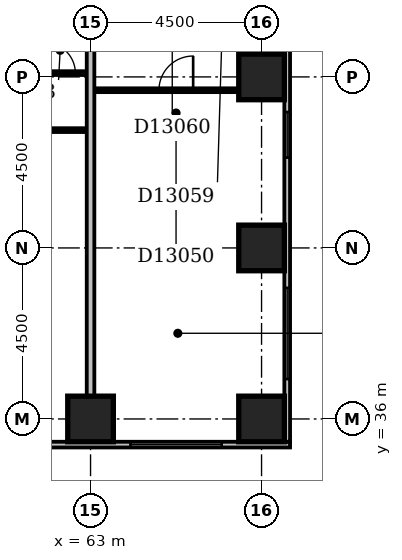
"""IFC4 building model, lengths in metres.
Left out: names, types, materials, properties, quantities, classifications, styles, units other than length and angle.
Written with IfcOpenShell. Run it as: python <this file> out.ifc"""

import sys

from ifc_helpers import new_model, si_unit, direction, frame, frame_2d, origin, origin_2d, place, context, subcontext, project, spatial, rectangle, extrude, element, fill, save


model = new_model("IFC4")
c1 = context("Model", 3, precision=1e-05, world=origin(), true_north=direction((0.0, 1.0)))
c2 = subcontext(c1, "Body", "Model", "MODEL_VIEW")
j1 = project(units=[si_unit("LENGTHUNIT", "METRE"), si_unit("PLANEANGLEUNIT", "RADIAN")], contexts=[c1])
p1 = place(None, origin())
s1 = spatial("IfcSite", under=j1, at=p1, CompositionType="ELEMENT")
p2 = place(p1, origin())
s2 = spatial("IfcBuilding", under=s1, at=p2, CompositionType="ELEMENT")
p3 = place(p2, frame((0.0, 0.0, 57.8)))
s3 = spatial("IfcBuildingStorey", under=s2, at=p3, CompositionType="ELEMENT", Elevation=57.8)
for number, where, z_axis, x_axis in (
    (1, (63.0, 36.0, -0.3), (0.0, 0.0, 1.0), (1.0, 0.0, 0.0)),
    (2, (67.5, 36.0, -0.3), (0.0, 0.0, 1.0), (1.0, 0.0, 0.0)),
    (3, (67.5, 40.5, -0.3), (0.0, 0.0, 1.0), (1.0, 0.0, 0.0)),
    (4, (67.5, 45.0, -0.3), (0.0, 0.0, 1.0), (1.0, 0.0, 0.0)),
):
    element("IfcColumn", number, at=place(p3, frame(where, z_axis=z_axis, x_axis=x_axis)), inside=s3, PredefinedType="COLUMN", context=c2, shape_type="SweptSolid", body=[
        extrude(rectangle(XDim=1.2, YDim=1.2, at=origin_2d()), origin(), (0.0, 0.0, 1.0), 3.6),
    ])
p4 = place(p3, frame((23.1, 35.325, 0.0), z_axis=(0.0, 0.0, 1.0), x_axis=(1.0, 0.0, 0.0)))
e5 = element("IfcWall", 5, at=p4, inside=s3, PredefinedType="STANDARD", context=c2, shape_type="SweptSolid", body=[
    extrude(rectangle(XDim=45.15, YDim=0.15, at=frame_2d((22.575, 0.0))), origin(), (0.0, 0.0, 1.0), 2.7),
])
p5 = place(p4, frame((0.45, 0.0, 0.6)))
e6 = element("IfcOpeningElement", 6, at=p5, cuts=e5, PredefinedType="OPENING", context=c2, shape_type="SweptSolid", body=[
    extrude(rectangle(XDim=2.4, YDim=1.8, at=frame_2d((1.2, 0.9))), frame((0.0, 0.087, 0.0), z_axis=(0.0, -1.0, 0.0), x_axis=(1.0, 0.0, 0.0)), (0.0, 0.0, 1.0), 0.174),
])
p6 = place(p4, frame((6.854, 0.0, 0.6)))
e7 = element("IfcOpeningElement", 7, at=p6, cuts=e5, PredefinedType="OPENING", context=c2, shape_type="SweptSolid", body=[
    extrude(rectangle(XDim=0.6, YDim=1.8, at=frame_2d((0.3, 0.9))), frame((0.0, 0.087, 0.0), z_axis=(0.0, -1.0, 0.0), x_axis=(1.0, 0.0, 0.0)), (0.0, 0.0, 1.0), 0.174),
])
p7 = place(p4, frame((9.45, 0.0, 0.6)))
e8 = element("IfcOpeningElement", 8, at=p7, cuts=e5, PredefinedType="OPENING", context=c2, shape_type="SweptSolid", body=[
    extrude(rectangle(XDim=2.4, YDim=1.8, at=frame_2d((1.2, 0.9))), frame((0.0, 0.087, 0.0), z_axis=(0.0, -1.0, 0.0), x_axis=(1.0, 0.0, 0.0)), (0.0, 0.0, 1.0), 0.174),
])
p8 = place(p4, frame((13.95, 0.0, 0.6)))
e9 = element("IfcOpeningElement", 9, at=p8, cuts=e5, PredefinedType="OPENING", context=c2, shape_type="SweptSolid", body=[
    extrude(rectangle(XDim=2.4, YDim=1.8, at=frame_2d((1.2, 0.9))), frame((0.0, 0.087, 0.0), z_axis=(0.0, -1.0, 0.0), x_axis=(1.0, 0.0, 0.0)), (0.0, 0.0, 1.0), 0.174),
])
p9 = place(p4, frame((18.323, 0.0, 0.6)))
e10 = element("IfcOpeningElement", 10, at=p9, cuts=e5, PredefinedType="OPENING", context=c2, shape_type="SweptSolid", body=[
    extrude(rectangle(XDim=1.2, YDim=1.8, at=frame_2d((0.6, 0.9))), frame((0.0, 0.087, 0.0), z_axis=(0.0, -1.0, 0.0), x_axis=(1.0, 0.0, 0.0)), (0.0, 0.0, 1.0), 0.174),
])
p10 = place(p4, frame((22.95, 0.0, 0.6)))
e11 = element("IfcOpeningElement", 11, at=p10, cuts=e5, PredefinedType="OPENING", context=c2, shape_type="SweptSolid", body=[
    extrude(rectangle(XDim=2.4, YDim=1.8, at=frame_2d((1.2, 0.9))), frame((0.0, 0.087, 0.0), z_axis=(0.0, -1.0, 0.0), x_axis=(1.0, 0.0, 0.0)), (0.0, 0.0, 1.0), 0.174),
])
p11 = place(p4, frame((27.45, 0.0, 0.6)))
e12 = element("IfcOpeningElement", 12, at=p11, cuts=e5, PredefinedType="OPENING", context=c2, shape_type="SweptSolid", body=[
    extrude(rectangle(XDim=2.4, YDim=1.8, at=frame_2d((1.2, 0.9))), frame((0.0, 0.087, 0.0), z_axis=(0.0, -1.0, 0.0), x_axis=(1.0, 0.0, 0.0)), (0.0, 0.0, 1.0), 0.174),
])
p12 = place(p4, frame((31.706, 0.0, 0.6)))
e13 = element("IfcOpeningElement", 13, at=p12, cuts=e5, PredefinedType="OPENING", context=c2, shape_type="SweptSolid", body=[
    extrude(rectangle(XDim=1.2, YDim=1.8, at=frame_2d((0.6, 0.9))), frame((0.0, 0.087, 0.0), z_axis=(0.0, -1.0, 0.0), x_axis=(1.0, 0.0, 0.0)), (0.0, 0.0, 1.0), 0.174),
])
p13 = place(p4, frame((36.45, 0.0, 0.6)))
e14 = element("IfcOpeningElement", 14, at=p13, cuts=e5, PredefinedType="OPENING", context=c2, shape_type="SweptSolid", body=[
    extrude(rectangle(XDim=2.4, YDim=1.8, at=frame_2d((1.2, 0.9))), frame((0.0, 0.087, 0.0), z_axis=(0.0, -1.0, 0.0), x_axis=(1.0, 0.0, 0.0)), (0.0, 0.0, 1.0), 0.174),
])
p14 = place(p4, frame((40.95, 0.0, 0.6)))
e15 = element("IfcOpeningElement", 15, at=p14, cuts=e5, PredefinedType="OPENING", context=c2, shape_type="SweptSolid", body=[
    extrude(rectangle(XDim=2.4, YDim=1.8, at=frame_2d((1.2, 0.9))), frame((0.0, 0.087, 0.0), z_axis=(0.0, -1.0, 0.0), x_axis=(1.0, 0.0, 0.0)), (0.0, 0.0, 1.0), 0.174),
])
p15 = place(p3, frame((68.175, 35.4, 0.0), z_axis=(0.0, 0.0, 1.0), x_axis=(0.0, 1.0, 0.0)))
e16 = element("IfcWall", 16, at=p15, inside=s3, PredefinedType="STANDARD", context=c2, shape_type="SweptSolid", body=[
    extrude(rectangle(XDim=23.85, YDim=0.15, at=frame_2d((11.925, 0.0))), origin(), (0.0, 0.0, 1.0), 2.7),
])
p16 = place(p15, frame((1.65, 0.0, 0.6)))
e17 = element("IfcOpeningElement", 17, at=p16, cuts=e16, PredefinedType="OPENING", context=c2, shape_type="SweptSolid", body=[
    extrude(rectangle(XDim=2.4, YDim=1.8, at=frame_2d((1.2, 0.9))), frame((0.0, 0.087, 0.0), z_axis=(0.0, -1.0, 0.0), x_axis=(1.0, 0.0, 0.0)), (0.0, 0.0, 1.0), 0.174),
])
p17 = place(p15, frame((7.477, 0.0, 0.6)))
e18 = element("IfcOpeningElement", 18, at=p17, cuts=e16, PredefinedType="OPENING", context=c2, shape_type="SweptSolid", body=[
    extrude(rectangle(XDim=1.2, YDim=1.8, at=frame_2d((0.6, 0.9))), frame((0.0, 0.087, 0.0), z_axis=(0.0, -1.0, 0.0), x_axis=(1.0, 0.0, 0.0)), (0.0, 0.0, 1.0), 0.174),
])
p18 = place(p3, frame((63.0, 36.6, 0.0), z_axis=(0.0, 0.0, 1.0), x_axis=(0.0, 1.0, 0.0)))
e19 = element("IfcWall", 19, at=p18, inside=s3, PredefinedType="PARTITIONING", context=c2, shape_type="SweptSolid", body=[
    extrude(rectangle(XDim=12.8, YDim=0.2, at=frame_2d((6.4, 0.0))), origin(), (0.0, 0.0, 1.0), 2.4),
])
p19 = place(p3, frame((54.1, 43.6, 0.0), z_axis=(0.0, 0.0, 1.0), x_axis=(1.0, 0.0, 0.0)))
e20 = element("IfcWall", 20, at=p19, inside=s3, PredefinedType="PARTITIONING", context=c2, shape_type="SweptSolid", body=[
    extrude(rectangle(XDim=8.8, YDim=0.1, at=frame_2d((4.4, 0.0))), origin(), (0.0, 0.0, 1.0), 3.3),
])
p20 = place(p19, frame((1.7, 0.0, 0.0)))
e21 = element("IfcOpeningElement", 21, at=p20, cuts=e20, PredefinedType="OPENING", context=c2, shape_type="SweptSolid", body=[
    extrude(rectangle(XDim=0.9, YDim=2.1, at=frame_2d((0.45, 1.05))), frame((0.0, 0.062, 0.0), z_axis=(0.0, -1.0, 0.0), x_axis=(1.0, 0.0, 0.0)), (0.0, 0.0, 1.0), 0.124),
])
p21 = place(p19, frame((6.2, 0.0, 0.0)))
e22 = element("IfcOpeningElement", 22, at=p21, cuts=e20, PredefinedType="OPENING", context=c2, shape_type="SweptSolid", body=[
    extrude(rectangle(XDim=0.9, YDim=2.1, at=frame_2d((0.45, 1.05))), frame((0.0, 0.062, 0.0), z_axis=(0.0, -1.0, 0.0), x_axis=(1.0, 0.0, 0.0)), (0.0, 0.0, 1.0), 0.124),
])
p22 = place(p3, frame((63.1, 44.65, 0.0), z_axis=(0.0, 0.0, 1.0), x_axis=(1.0, 0.0, 0.0)))
e23 = element("IfcWall", 23, at=p22, inside=s3, PredefinedType="PARTITIONING", context=c2, shape_type="SweptSolid", body=[
    extrude(rectangle(XDim=3.8, YDim=0.1, at=frame_2d((1.9, 0.0))), origin(), (0.0, 0.0, 1.0), 3.3),
])
p23 = place(p22, frame((1.7, 0.0, 0.0)))
e24 = element("IfcOpeningElement", 24, at=p23, cuts=e23, PredefinedType="OPENING", context=c2, shape_type="SweptSolid", body=[
    extrude(rectangle(XDim=0.9, YDim=2.1, at=frame_2d((0.45, 1.05))), frame((0.0, 0.062, 0.0), z_axis=(0.0, -1.0, 0.0), x_axis=(1.0, 0.0, 0.0)), (0.0, 0.0, 1.0), 0.124),
])
p24 = place(p3, frame((55.65, 45.1, 0.0), z_axis=(0.0, 0.0, 1.0), x_axis=(1.0, 0.0, 0.0)))
e25 = element("IfcWall", 25, at=p24, inside=s3, PredefinedType="PARTITIONING", context=c2, shape_type="SweptSolid", body=[
    extrude(rectangle(XDim=7.25, YDim=0.1, at=frame_2d((3.625, 0.0))), origin(), (0.0, 0.0, 1.0), 3.3),
])
p25 = place(p24, frame((4.15, 0.0, 0.0)))
e26 = element("IfcOpeningElement", 26, at=p25, cuts=e25, PredefinedType="OPENING", context=c2, shape_type="SweptSolid", body=[
    extrude(rectangle(XDim=0.8, YDim=2.1, at=frame_2d((0.4, 1.05))), frame((0.0, 0.062, 0.0), z_axis=(0.0, -1.0, 0.0), x_axis=(1.0, 0.0, 0.0)), (0.0, 0.0, 1.0), 0.124),
])
p26 = place(p24, frame((1.2, 0.0, 0.0)))
e27 = element("IfcOpeningElement", 27, at=p26, cuts=e25, PredefinedType="OPENING", context=c2, shape_type="SweptSolid", body=[
    extrude(rectangle(XDim=0.9, YDim=2.1, at=frame_2d((0.45, 1.05))), frame((0.0, 0.062, 0.0), z_axis=(0.0, -1.0, 0.0), x_axis=(1.0, 0.0, 0.0)), (0.0, 0.0, 1.0), 0.124),
])
p27 = place(p24, frame((6.15, 0.0, 0.0)))
e28 = element("IfcOpeningElement", 28, at=p27, cuts=e25, PredefinedType="OPENING", context=c2, shape_type="SweptSolid", body=[
    extrude(rectangle(XDim=0.8, YDim=2.1, at=frame_2d((0.4, 1.05))), frame((0.0, 0.062, 0.0), z_axis=(0.0, -1.0, 0.0), x_axis=(1.0, 0.0, 0.0)), (0.0, 0.0, 1.0), 0.124),
])
p28 = place(p14, origin())
e29 = element("IfcWindow", 29, at=p28, inside=s3, PartitioningType="SINGLE_PANEL", PredefinedType="WINDOW", context=c2, shape_type="SweptSolid", body=[
    extrude(rectangle(XDim=2.4, YDim=1.8, at=frame_2d((1.2, 0.9))), frame((0.0, 0.03, 0.0), z_axis=(0.0, -1.0, 0.0), x_axis=(1.0, 0.0, 0.0)), (0.0, 0.0, 1.0), 0.06),
])
fill(e15, e29)
p29 = place(p16, origin())
e30 = element("IfcWindow", 30, at=p29, inside=s3, PartitioningType="SINGLE_PANEL", PredefinedType="WINDOW", context=c2, shape_type="SweptSolid", body=[
    extrude(rectangle(XDim=2.4, YDim=1.8, at=frame_2d((1.2, 0.9))), frame((0.0, 0.03, 0.0), z_axis=(0.0, -1.0, 0.0), x_axis=(1.0, 0.0, 0.0)), (0.0, 0.0, 1.0), 0.06),
])
fill(e17, e30)
p30 = place(p17, origin())
e31 = element("IfcWindow", 31, at=p30, inside=s3, PartitioningType="SINGLE_PANEL", PredefinedType="WINDOW", context=c2, shape_type="SweptSolid", body=[
    extrude(rectangle(XDim=1.2, YDim=1.8, at=frame_2d((0.6, 0.9))), frame((0.0, 0.03, 0.0), z_axis=(0.0, -1.0, 0.0), x_axis=(1.0, 0.0, 0.0)), (0.0, 0.0, 1.0), 0.06),
])
fill(e18, e31)
p31 = place(p23, frame((0.9, 0.0, 0.0), z_axis=(0.0, 0.0, 1.0), x_axis=(-1.0, 0.0, 0.0)))
e32 = element("IfcDoor", 32, at=p31, inside=s3, OperationType="SINGLE_SWING_LEFT", PredefinedType="DOOR", context=c2, shape_type="SweptSolid", body=[
    extrude(rectangle(XDim=0.9, YDim=2.1, at=frame_2d((0.45, 1.05))), frame((0.0, 0.025, 0.0), z_axis=(0.0, -1.0, 0.0), x_axis=(1.0, 0.0, 0.0)), (0.0, 0.0, 1.0), 0.05),
])
fill(e24, e32)
p32 = place(p27, origin())
e33 = element("IfcDoor", 33, at=p32, inside=s3, OperationType="SINGLE_SWING_LEFT", PredefinedType="DOOR", context=c2, shape_type="SweptSolid", body=[
    extrude(rectangle(XDim=0.8, YDim=2.1, at=frame_2d((0.4, 1.05))), frame((0.0, 0.025, 0.0), z_axis=(0.0, -1.0, 0.0), x_axis=(1.0, 0.0, 0.0)), (0.0, 0.0, 1.0), 0.05),
])
fill(e28, e33)
save(model, sys.argv[1])
